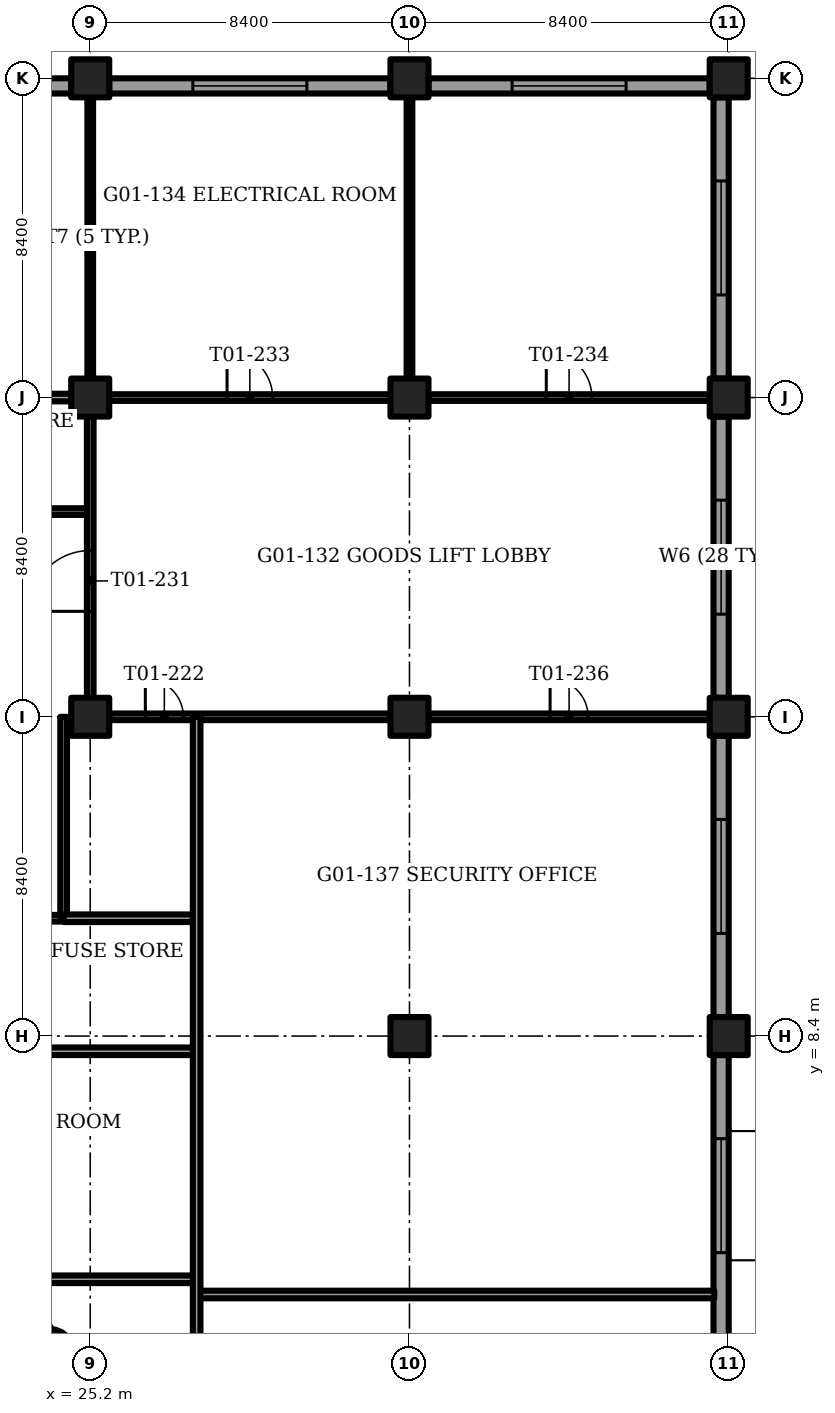
"""IFC4 building model, lengths in metres.
Left out: names, types, materials, properties, quantities, classifications, styles, units other than length and angle.
Written with IfcOpenShell. Run it as: python <this file> out.ifc"""

import sys

from ifc_helpers import new_model, si_unit, direction, frame, frame_2d, origin, origin_2d, place, context, subcontext, project, spatial, rectangle, circle, extrude, element, fill, save


model = new_model("IFC4")
c1 = context("Model", 3, precision=1e-05, world=origin(), true_north=direction((0.0, 1.0)))
c2 = subcontext(c1, "Body", "Model", "MODEL_VIEW")
j1 = project(units=[si_unit("LENGTHUNIT", "METRE"), si_unit("PLANEANGLEUNIT", "RADIAN")], contexts=[c1])
p1 = place(None, origin())
s1 = spatial("IfcSite", under=j1, at=p1, CompositionType="ELEMENT")
p2 = place(p1, origin())
s2 = spatial("IfcBuilding", under=s1, at=p2, CompositionType="ELEMENT")
p3 = place(p2, frame((0.0, 0.0, 6.0)))
s3 = spatial("IfcBuildingStorey", under=s2, at=p3, CompositionType="ELEMENT", Elevation=6.0)
for number, where, z_axis, x_axis in (
    (1, (25.2, 16.8, -0.35), (0.0, 0.0, 1.0), (1.0, 0.0, 0.0)),
    (2, (25.2, 25.2, -0.35), (0.0, 0.0, 1.0), (1.0, 0.0, 0.0)),
    (3, (25.2, 33.6, -0.35), (0.0, 0.0, 1.0), (1.0, 0.0, 0.0)),
    (4, (33.6, 8.4, -0.35), (0.0, 0.0, 1.0), (1.0, 0.0, 0.0)),
    (5, (33.6, 16.8, -0.35), (0.0, 0.0, 1.0), (1.0, 0.0, 0.0)),
    (6, (33.6, 25.2, -0.35), (0.0, 0.0, 1.0), (1.0, 0.0, 0.0)),
    (7, (33.6, 33.6, -0.35), (0.0, 0.0, 1.0), (1.0, 0.0, 0.0)),
    (8, (42.0, 8.4, -0.35), (0.0, 0.0, 1.0), (1.0, 0.0, 0.0)),
    (9, (42.0, 16.8, -0.35), (0.0, 0.0, 1.0), (1.0, 0.0, 0.0)),
    (10, (42.0, 25.2, -0.35), (0.0, 0.0, 1.0), (1.0, 0.0, 0.0)),
    (11, (42.0, 33.6, -0.35), (0.0, 0.0, 1.0), (1.0, 0.0, 0.0)),
):
    element("IfcColumn", number, at=place(p3, frame(where, z_axis=z_axis, x_axis=x_axis)), inside=s3, PredefinedType="COLUMN", context=c2, shape_type="SweptSolid", body=[
        extrude(rectangle(XDim=1.0, YDim=1.0, at=origin_2d()), origin(), (0.0, 0.0, 1.0), 4.0),
    ])
p4 = place(p3, frame((24.101, 0.0, -1.2), z_axis=(0.0, 0.0, 1.0), x_axis=(1.0, 0.0, 0.0)))
e12 = element("IfcColumn", 12, at=p4, inside=s3, PredefinedType="COLUMN", context=c2, shape_type="SweptSolid", body=[
    extrude(circle(Radius=0.7, at=origin_2d()), origin(), (0.0, 0.0, 1.0), 4.0),
])
p5 = place(p3, frame((41.8, 33.1, 0.0), z_axis=(0.0, 0.0, 1.0), x_axis=(0.0, -1.0, 0.0)))
e13 = element("IfcWall", 13, at=p5, inside=s3, PredefinedType="SOLIDWALL", context=c2, shape_type="SweptSolid", body=[
    extrude(rectangle(XDim=7.4, YDim=0.4, at=frame_2d((3.7, 0.0))), origin(), (0.0, 0.0, 1.0), 3.65),
])
p6 = place(p5, frame((2.2, 0.0, 1.0)))
e14 = element("IfcOpeningElement", 14, at=p6, cuts=e13, PredefinedType="OPENING", context=c2, shape_type="SweptSolid", body=[
    extrude(rectangle(XDim=3.0, YDim=2.2, at=frame_2d((1.5, 1.1))), frame((0.0, 0.2, 0.0), z_axis=(0.0, -1.0, 0.0), x_axis=(1.0, 0.0, 0.0)), (0.0, 0.0, 1.0), 0.4),
])
p7 = place(p3, frame((41.8, 24.7, 0.0), z_axis=(0.0, 0.0, 1.0), x_axis=(0.0, -1.0, 0.0)))
e15 = element("IfcWall", 15, at=p7, inside=s3, PredefinedType="SOLIDWALL", context=c2, shape_type="SweptSolid", body=[
    extrude(rectangle(XDim=7.4, YDim=0.4, at=frame_2d((3.7, 0.0))), origin(), (0.0, 0.0, 1.0), 3.65),
])
p8 = place(p7, frame((2.2, 0.0, 1.0)))
e16 = element("IfcOpeningElement", 16, at=p8, cuts=e15, PredefinedType="OPENING", context=c2, shape_type="SweptSolid", body=[
    extrude(rectangle(XDim=3.0, YDim=2.2, at=frame_2d((1.5, 1.1))), frame((0.0, 0.2, 0.0), z_axis=(0.0, -1.0, 0.0), x_axis=(1.0, 0.0, 0.0)), (0.0, 0.0, 1.0), 0.4),
])
p9 = place(p3, frame((41.8, 16.3, 0.0), z_axis=(0.0, 0.0, 1.0), x_axis=(0.0, -1.0, 0.0)))
e17 = element("IfcWall", 17, at=p9, inside=s3, PredefinedType="SOLIDWALL", context=c2, shape_type="SweptSolid", body=[
    extrude(rectangle(XDim=7.4, YDim=0.4, at=frame_2d((3.7, 0.0))), origin(), (0.0, 0.0, 1.0), 3.65),
])
p10 = place(p9, frame((2.2, 0.0, 1.0)))
e18 = element("IfcOpeningElement", 18, at=p10, cuts=e17, PredefinedType="OPENING", context=c2, shape_type="SweptSolid", body=[
    extrude(rectangle(XDim=3.0, YDim=2.2, at=frame_2d((1.5, 1.1))), frame((0.0, 0.2, 0.0), z_axis=(0.0, -1.0, 0.0), x_axis=(1.0, 0.0, 0.0)), (0.0, 0.0, 1.0), 0.4),
])
p11 = place(p3, frame((41.8, 7.9, 0.0), z_axis=(0.0, 0.0, 1.0), x_axis=(0.0, -1.0, 0.0)))
e19 = element("IfcWall", 19, at=p11, inside=s3, PredefinedType="SOLIDWALL", context=c2, shape_type="SweptSolid", body=[
    extrude(rectangle(XDim=7.4, YDim=0.4, at=frame_2d((3.7, 0.0))), origin(), (0.0, 0.0, 1.0), 3.65),
])
p12 = place(p11, frame((2.2, 0.0, 1.0)))
e20 = element("IfcOpeningElement", 20, at=p12, cuts=e19, PredefinedType="OPENING", context=c2, shape_type="SweptSolid", body=[
    extrude(rectangle(XDim=3.0, YDim=2.2, at=frame_2d((1.5, 1.1))), frame((0.0, 0.2, 0.0), z_axis=(0.0, -1.0, 0.0), x_axis=(1.0, 0.0, 0.0)), (0.0, 0.0, 1.0), 0.4),
])
p13 = place(p3, frame((17.3, 33.4, 0.0), z_axis=(0.0, 0.0, 1.0), x_axis=(1.0, 0.0, 0.0)))
e21 = element("IfcWall", 21, at=p13, inside=s3, PredefinedType="SOLIDWALL", context=c2, shape_type="SweptSolid", body=[
    extrude(rectangle(XDim=7.4, YDim=0.4, at=frame_2d((3.7, 0.0))), origin(), (0.0, 0.0, 1.0), 3.65),
])
p14 = place(p13, frame((2.2, 0.0, 1.0)))
e22 = element("IfcOpeningElement", 22, at=p14, cuts=e21, PredefinedType="OPENING", context=c2, shape_type="SweptSolid", body=[
    extrude(rectangle(XDim=3.0, YDim=2.2, at=frame_2d((1.5, 1.1))), frame((0.0, 0.2, 0.0), z_axis=(0.0, -1.0, 0.0), x_axis=(1.0, 0.0, 0.0)), (0.0, 0.0, 1.0), 0.4),
])
p15 = place(p3, frame((25.7, 33.4, 0.0), z_axis=(0.0, 0.0, 1.0), x_axis=(1.0, 0.0, 0.0)))
e23 = element("IfcWall", 23, at=p15, inside=s3, PredefinedType="SOLIDWALL", context=c2, shape_type="SweptSolid", body=[
    extrude(rectangle(XDim=7.4, YDim=0.4, at=frame_2d((3.7, 0.0))), origin(), (0.0, 0.0, 1.0), 3.65),
])
p16 = place(p15, frame((2.2, 0.0, 1.0)))
e24 = element("IfcOpeningElement", 24, at=p16, cuts=e23, PredefinedType="OPENING", context=c2, shape_type="SweptSolid", body=[
    extrude(rectangle(XDim=3.0, YDim=2.2, at=frame_2d((1.5, 1.1))), frame((0.0, 0.2, 0.0), z_axis=(0.0, -1.0, 0.0), x_axis=(1.0, 0.0, 0.0)), (0.0, 0.0, 1.0), 0.4),
])
p17 = place(p3, frame((34.1, 33.4, 0.0), z_axis=(0.0, 0.0, 1.0), x_axis=(1.0, 0.0, 0.0)))
e25 = element("IfcWall", 25, at=p17, inside=s3, PredefinedType="SOLIDWALL", context=c2, shape_type="SweptSolid", body=[
    extrude(rectangle(XDim=7.4, YDim=0.4, at=frame_2d((3.7, 0.0))), origin(), (0.0, 0.0, 1.0), 3.65),
])
p18 = place(p17, frame((2.2, 0.0, 1.0)))
e26 = element("IfcOpeningElement", 26, at=p18, cuts=e25, PredefinedType="OPENING", context=c2, shape_type="SweptSolid", body=[
    extrude(rectangle(XDim=3.0, YDim=2.2, at=frame_2d((1.5, 1.1))), frame((0.0, 0.2, 0.0), z_axis=(0.0, -1.0, 0.0), x_axis=(1.0, 0.0, 0.0)), (0.0, 0.0, 1.0), 0.4),
])
p19 = place(p3, frame((22.302, 11.5, 0.0), z_axis=(0.0, 0.0, 1.0), x_axis=(1.0, 0.0, 0.0)))
e27 = element("IfcWall", 27, at=p19, inside=s3, PredefinedType="PARTITIONING", context=c2, shape_type="SweptSolid", body=[
    extrude(rectangle(XDim=2.198, YDim=0.175, at=frame_2d((1.099, 0.0))), origin(), (0.0, 0.0, 1.0), 3.65),
])
p20 = place(p3, frame((25.7, 16.8, 0.0), z_axis=(0.0, 0.0, 1.0), x_axis=(1.0, 0.0, 0.0)))
e28 = element("IfcWall", 28, at=p20, inside=s3, PredefinedType="PARTITIONING", context=c2, shape_type="SweptSolid", body=[
    extrude(rectangle(XDim=7.4, YDim=0.175, at=frame_2d((3.7, 0.0))), origin(), (0.0, 0.0, 1.0), 3.65),
])
p21 = place(p20, frame((0.95, 0.0, 0.0)))
e29 = element("IfcOpeningElement", 29, at=p21, cuts=e28, PredefinedType="OPENING", context=c2, shape_type="SweptSolid", body=[
    extrude(rectangle(XDim=1.0, YDim=2.1, at=frame_2d((0.5, 1.05))), frame((0.0, 0.087, 0.0), z_axis=(0.0, -1.0, 0.0), x_axis=(1.0, 0.0, 0.0)), (0.0, 0.0, 1.0), 0.175),
])
p22 = place(p3, frame((34.1, 16.8, 0.0), z_axis=(0.0, 0.0, 1.0), x_axis=(1.0, 0.0, 0.0)))
e30 = element("IfcWall", 30, at=p22, inside=s3, PredefinedType="PARTITIONING", context=c2, shape_type="SweptSolid", body=[
    extrude(rectangle(XDim=7.4, YDim=0.175, at=frame_2d((3.7, 0.0))), origin(), (0.0, 0.0, 1.0), 3.65),
])
p23 = place(p22, frame((3.2, 0.0, 0.0)))
e31 = element("IfcOpeningElement", 31, at=p23, cuts=e30, PredefinedType="OPENING", context=c2, shape_type="SweptSolid", body=[
    extrude(rectangle(XDim=1.0, YDim=2.1, at=frame_2d((0.5, 1.05))), frame((0.0, 0.087, 0.0), z_axis=(0.0, -1.0, 0.0), x_axis=(1.0, 0.0, 0.0)), (0.0, 0.0, 1.0), 0.175),
])
p24 = place(p3, frame((-17.0, 22.2, 0.0), z_axis=(0.0, 0.0, 1.0), x_axis=(1.0, 0.0, 0.0)))
e32 = element("IfcWall", 32, at=p24, inside=s3, PredefinedType="PARTITIONING", context=c2, shape_type="SweptSolid", body=[
    extrude(rectangle(XDim=42.2, YDim=0.175, at=frame_2d((21.1, 0.0))), origin(), (0.0, 0.0, 1.0), 3.65),
])
p25 = place(p24, frame((1.262, 0.0, 0.0)))
e33 = element("IfcOpeningElement", 33, at=p25, cuts=e32, PredefinedType="OPENING", context=c2, shape_type="SweptSolid", body=[
    extrude(rectangle(XDim=1.0, YDim=2.1, at=frame_2d((0.5, 1.05))), frame((0.0, 0.087, 0.0), z_axis=(0.0, -1.0, 0.0), x_axis=(1.0, 0.0, 0.0)), (0.0, 0.0, 1.0), 0.175),
])
p26 = place(p24, frame((15.344, 0.0, 0.0)))
e34 = element("IfcOpeningElement", 34, at=p26, cuts=e32, PredefinedType="OPENING", context=c2, shape_type="SweptSolid", body=[
    extrude(rectangle(XDim=1.0, YDim=2.1, at=frame_2d((0.5, 1.05))), frame((0.0, 0.087, 0.0), z_axis=(0.0, -1.0, 0.0), x_axis=(1.0, 0.0, 0.0)), (0.0, 0.0, 1.0), 0.175),
])
p27 = place(p24, frame((17.656, 0.0, 0.0)))
e35 = element("IfcOpeningElement", 35, at=p27, cuts=e32, PredefinedType="OPENING", context=c2, shape_type="SweptSolid", body=[
    extrude(rectangle(XDim=1.0, YDim=2.1, at=frame_2d((0.5, 1.05))), frame((0.0, 0.087, 0.0), z_axis=(0.0, -1.0, 0.0), x_axis=(1.0, 0.0, 0.0)), (0.0, 0.0, 1.0), 0.175),
])
p28 = place(p24, frame((31.488, 0.0, 0.0)))
e36 = element("IfcOpeningElement", 36, at=p28, cuts=e32, PredefinedType="OPENING", context=c2, shape_type="SweptSolid", body=[
    extrude(rectangle(XDim=1.0, YDim=2.1, at=frame_2d((0.5, 1.05))), frame((0.0, 0.087, 0.0), z_axis=(0.0, -1.0, 0.0), x_axis=(1.0, 0.0, 0.0)), (0.0, 0.0, 1.0), 0.175),
])
p29 = place(p24, frame((37.35, 0.0, 0.0)))
e37 = element("IfcOpeningElement", 37, at=p29, cuts=e32, PredefinedType="OPENING", context=c2, shape_type="SweptSolid", body=[
    extrude(rectangle(XDim=1.0, YDim=2.1, at=frame_2d((0.5, 1.05))), frame((0.0, 0.087, 0.0), z_axis=(0.0, -1.0, 0.0), x_axis=(1.0, 0.0, 0.0)), (0.0, 0.0, 1.0), 0.175),
])
p30 = place(p3, frame((25.7, 25.2, 0.0), z_axis=(0.0, 0.0, 1.0), x_axis=(1.0, 0.0, 0.0)))
e38 = element("IfcWall", 38, at=p30, inside=s3, PredefinedType="PARTITIONING", context=c2, shape_type="SweptSolid", body=[
    extrude(rectangle(XDim=7.4, YDim=0.175, at=frame_2d((3.7, 0.0))), origin(), (0.0, 0.0, 1.0), 3.65),
])
p31 = place(p30, frame((3.1, 0.0, 0.0)))
e39 = element("IfcOpeningElement", 39, at=p31, cuts=e38, PredefinedType="OPENING", context=c2, shape_type="SweptSolid", body=[
    extrude(rectangle(XDim=1.2, YDim=2.1, at=frame_2d((0.6, 1.05))), frame((0.0, 0.087, 0.0), z_axis=(0.0, -1.0, 0.0), x_axis=(1.0, 0.0, 0.0)), (0.0, 0.0, 1.0), 0.175),
])
p32 = place(p3, frame((34.1, 25.2, 0.0), z_axis=(0.0, 0.0, 1.0), x_axis=(1.0, 0.0, 0.0)))
e40 = element("IfcWall", 40, at=p32, inside=s3, PredefinedType="PARTITIONING", context=c2, shape_type="SweptSolid", body=[
    extrude(rectangle(XDim=7.4, YDim=0.175, at=frame_2d((3.7, 0.0))), origin(), (0.0, 0.0, 1.0), 3.65),
])
p33 = place(p32, frame((3.1, 0.0, 0.0)))
e41 = element("IfcOpeningElement", 41, at=p33, cuts=e40, PredefinedType="OPENING", context=c2, shape_type="SweptSolid", body=[
    extrude(rectangle(XDim=1.2, YDim=2.1, at=frame_2d((0.6, 1.05))), frame((0.0, 0.087, 0.0), z_axis=(0.0, -1.0, 0.0), x_axis=(1.0, 0.0, 0.0)), (0.0, 0.0, 1.0), 0.175),
])
p34 = place(p3, frame((24.5, 11.5, 0.0), z_axis=(0.0, 0.0, 1.0), x_axis=(0.0, 1.0, 0.0)))
e42 = element("IfcWall", 42, at=p34, inside=s3, PredefinedType="PARTITIONING", context=c2, shape_type="SweptSolid", body=[
    extrude(rectangle(XDim=5.3, YDim=0.175, at=frame_2d((2.65, 0.0))), origin(), (0.0, 0.0, 1.0), 3.65),
])
p35 = place(p3, frame((25.2, 17.3, 0.0), z_axis=(0.0, 0.0, 1.0), x_axis=(0.0, 1.0, 0.0)))
e43 = element("IfcWall", 43, at=p35, inside=s3, PredefinedType="PARTITIONING", context=c2, shape_type="SweptSolid", body=[
    extrude(rectangle(XDim=7.4, YDim=0.175, at=frame_2d((3.7, 0.0))), origin(), (0.0, 0.0, 1.0), 3.65),
])
p36 = place(p35, frame((2.275, 0.0, 0.0)))
e44 = element("IfcOpeningElement", 44, at=p36, cuts=e43, PredefinedType="OPENING", context=c2, shape_type="SweptSolid", body=[
    extrude(rectangle(XDim=1.6, YDim=2.1, at=frame_2d((0.8, 1.05))), frame((0.0, 0.087, 0.0), z_axis=(0.0, -1.0, 0.0), x_axis=(1.0, 0.0, 0.0)), (0.0, 0.0, 1.0), 0.175),
])
p37 = place(p3, frame((28.0, 1.6, 0.0), z_axis=(0.0, 0.0, 1.0), x_axis=(1.0, 0.0, 0.0)))
e45 = element("IfcWall", 45, at=p37, inside=s3, PredefinedType="PARTITIONING", context=c2, shape_type="SweptSolid", body=[
    extrude(rectangle(XDim=13.62, YDim=0.2, at=frame_2d((6.81, 0.0))), origin(), (0.0, 0.0, 1.0), 3.65),
])
for number, where, z_axis, x_axis in (
    (46, (14.0, 2.0, 0.0), (0.0, 0.0, 1.0), (1.0, 0.0, 0.0)),
    (47, (14.0, 8.0, 0.0), (0.0, 0.0, 1.0), (1.0, 0.0, 0.0)),
):
    element("IfcWall", number, at=place(p3, frame(where, z_axis=z_axis, x_axis=x_axis)), inside=s3, PredefinedType="PARTITIONING", context=c2, shape_type="SweptSolid", body=[
        extrude(rectangle(XDim=14.0, YDim=0.2, at=frame_2d((7.0, 0.0))), origin(), (0.0, 0.0, 1.0), 2.8),
    ])
p38 = place(p3, frame((24.5, 11.5, 0.0), z_axis=(0.0, 0.0, 1.0), x_axis=(1.0, 0.0, 0.0)))
e48 = element("IfcWall", 48, at=p38, inside=s3, PredefinedType="PARTITIONING", context=c2, shape_type="SweptSolid", body=[
    extrude(rectangle(XDim=3.5, YDim=0.2, at=frame_2d((1.75, 0.0))), origin(), (0.0, 0.0, 1.0), 3.65),
])
p39 = place(p3, frame((15.0, 25.2, 0.0), z_axis=(0.0, 0.0, 1.0), x_axis=(1.0, 0.0, 0.0)))
e49 = element("IfcWall", 49, at=p39, inside=s3, PredefinedType="PARTITIONING", context=c2, shape_type="SweptSolid", body=[
    extrude(rectangle(XDim=9.7, YDim=0.2, at=frame_2d((4.85, 0.0))), origin(), (0.0, 0.0, 1.0), 3.65),
])
p40 = place(p39, frame((0.25, 0.0, 0.0)))
e50 = element("IfcOpeningElement", 50, at=p40, cuts=e49, PredefinedType="OPENING", context=c2, shape_type="SweptSolid", body=[
    extrude(rectangle(XDim=1.0, YDim=2.1, at=frame_2d((0.5, 1.05))), frame((0.0, 0.1, 0.0), z_axis=(0.0, -1.0, 0.0), x_axis=(1.0, 0.0, 0.0)), (0.0, 0.0, 1.0), 0.2),
])
p41 = place(p3, frame((28.0, -21.0, 0.0), z_axis=(0.0, 0.0, 1.0), x_axis=(0.0, 1.0, 0.0)))
e51 = element("IfcWall", 51, at=p41, inside=s3, PredefinedType="PARTITIONING", context=c2, shape_type="SweptSolid", body=[
    extrude(rectangle(XDim=37.8, YDim=0.2, at=frame_2d((18.9, 0.0))), origin(), (0.0, 0.0, 1.0), 3.65),
])
p42 = place(p41, frame((2.85, 0.0, 0.0)))
e52 = element("IfcOpeningElement", 52, at=p42, cuts=e51, PredefinedType="OPENING", context=c2, shape_type="SweptSolid", body=[
    extrude(rectangle(XDim=0.9, YDim=2.1, at=frame_2d((0.45, 1.05))), frame((0.0, 0.1, 0.0), z_axis=(0.0, -1.0, 0.0), x_axis=(1.0, 0.0, 0.0)), (0.0, 0.0, 1.0), 0.2),
])
p43 = place(p41, frame((12.15, 0.0, 0.0)))
e53 = element("IfcOpeningElement", 53, at=p43, cuts=e51, PredefinedType="OPENING", context=c2, shape_type="SweptSolid", body=[
    extrude(rectangle(XDim=1.0, YDim=2.1, at=frame_2d((0.5, 1.05))), frame((0.0, 0.1, 0.0), z_axis=(0.0, -1.0, 0.0), x_axis=(1.0, 0.0, 0.0)), (0.0, 0.0, 1.0), 0.2),
])
for number, where, z_axis, x_axis in (
    (54, (25.2, 25.7, 0.0), (0.0, 0.0, 1.0), (0.0, 1.0, 0.0)),
    (55, (33.6, 25.7, 0.0), (0.0, 0.0, 1.0), (0.0, 1.0, 0.0)),
):
    element("IfcWall", number, at=place(p3, frame(where, z_axis=z_axis, x_axis=x_axis)), inside=s3, PredefinedType="PARTITIONING", context=c2, shape_type="SweptSolid", body=[
        extrude(rectangle(XDim=7.4, YDim=0.15, at=frame_2d((3.7, 0.0))), origin(), (0.0, 0.0, 1.0), 3.65),
    ])
p44 = place(p6, origin())
e56 = element("IfcWindow", 56, at=p44, inside=s3, PartitioningType="SINGLE_PANEL", PredefinedType="WINDOW", context=c2, shape_type="SweptSolid", body=[
    extrude(rectangle(XDim=3.0, YDim=2.2, at=frame_2d((1.5, 1.1))), frame((0.0, 0.03, 0.0), z_axis=(0.0, -1.0, 0.0), x_axis=(1.0, 0.0, 0.0)), (0.0, 0.0, 1.0), 0.06),
])
fill(e14, e56)
p45 = place(p8, origin())
e57 = element("IfcWindow", 57, at=p45, inside=s3, PartitioningType="SINGLE_PANEL", PredefinedType="WINDOW", context=c2, shape_type="SweptSolid", body=[
    extrude(rectangle(XDim=3.0, YDim=2.2, at=frame_2d((1.5, 1.1))), frame((0.0, 0.03, 0.0), z_axis=(0.0, -1.0, 0.0), x_axis=(1.0, 0.0, 0.0)), (0.0, 0.0, 1.0), 0.06),
])
fill(e16, e57)
p46 = place(p10, origin())
e58 = element("IfcWindow", 58, at=p46, inside=s3, PartitioningType="SINGLE_PANEL", PredefinedType="WINDOW", context=c2, shape_type="SweptSolid", body=[
    extrude(rectangle(XDim=3.0, YDim=2.2, at=frame_2d((1.5, 1.1))), frame((0.0, 0.03, 0.0), z_axis=(0.0, -1.0, 0.0), x_axis=(1.0, 0.0, 0.0)), (0.0, 0.0, 1.0), 0.06),
])
fill(e18, e58)
p47 = place(p12, origin())
e59 = element("IfcWindow", 59, at=p47, inside=s3, PartitioningType="SINGLE_PANEL", PredefinedType="WINDOW", context=c2, shape_type="SweptSolid", body=[
    extrude(rectangle(XDim=3.0, YDim=2.2, at=frame_2d((1.5, 1.1))), frame((0.0, 0.03, 0.0), z_axis=(0.0, -1.0, 0.0), x_axis=(1.0, 0.0, 0.0)), (0.0, 0.0, 1.0), 0.06),
])
fill(e20, e59)
p48 = place(p16, origin())
e60 = element("IfcWindow", 60, at=p48, inside=s3, PartitioningType="SINGLE_PANEL", PredefinedType="WINDOW", context=c2, shape_type="SweptSolid", body=[
    extrude(rectangle(XDim=3.0, YDim=2.2, at=frame_2d((1.5, 1.1))), frame((0.0, 0.03, 0.0), z_axis=(0.0, -1.0, 0.0), x_axis=(1.0, 0.0, 0.0)), (0.0, 0.0, 1.0), 0.06),
])
fill(e24, e60)
p49 = place(p18, origin())
e61 = element("IfcWindow", 61, at=p49, inside=s3, PartitioningType="SINGLE_PANEL", PredefinedType="WINDOW", context=c2, shape_type="SweptSolid", body=[
    extrude(rectangle(XDim=3.0, YDim=2.2, at=frame_2d((1.5, 1.1))), frame((0.0, 0.03, 0.0), z_axis=(0.0, -1.0, 0.0), x_axis=(1.0, 0.0, 0.0)), (0.0, 0.0, 1.0), 0.06),
])
fill(e26, e61)
p50 = place(p21, origin())
e62 = element("IfcDoor", 62, at=p50, inside=s3, OperationType="SINGLE_SWING_RIGHT", PredefinedType="DOOR", context=c2, shape_type="SweptSolid", body=[
    extrude(rectangle(XDim=1.0, YDim=2.1, at=frame_2d((0.5, 1.05))), frame((0.0, 0.025, 0.0), z_axis=(0.0, -1.0, 0.0), x_axis=(1.0, 0.0, 0.0)), (0.0, 0.0, 1.0), 0.05),
])
fill(e29, e62)
p51 = place(p36, origin())
e63 = element("IfcDoor", 63, at=p51, inside=s3, OperationType="DOUBLE_DOOR_SINGLE_SWING", PredefinedType="DOOR", context=c2, shape_type="SweptSolid", body=[
    extrude(rectangle(XDim=1.6, YDim=2.1, at=frame_2d((0.8, 1.05))), frame((0.0, 0.025, 0.0), z_axis=(0.0, -1.0, 0.0), x_axis=(1.0, 0.0, 0.0)), (0.0, 0.0, 1.0), 0.05),
])
fill(e44, e63)
p52 = place(p31, origin())
e64 = element("IfcDoor", 64, at=p52, inside=s3, OperationType="SINGLE_SWING_LEFT", PredefinedType="DOOR", context=c2, shape_type="SweptSolid", body=[
    extrude(rectangle(XDim=1.2, YDim=2.1, at=frame_2d((0.6, 1.05))), frame((0.0, 0.025, 0.0), z_axis=(0.0, -1.0, 0.0), x_axis=(1.0, 0.0, 0.0)), (0.0, 0.0, 1.0), 0.05),
])
fill(e39, e64)
p53 = place(p33, origin())
e65 = element("IfcDoor", 65, at=p53, inside=s3, OperationType="SINGLE_SWING_RIGHT", PredefinedType="DOOR", context=c2, shape_type="SweptSolid", body=[
    extrude(rectangle(XDim=1.2, YDim=2.1, at=frame_2d((0.6, 1.05))), frame((0.0, 0.025, 0.0), z_axis=(0.0, -1.0, 0.0), x_axis=(1.0, 0.0, 0.0)), (0.0, 0.0, 1.0), 0.05),
])
fill(e41, e65)
p54 = place(p23, origin())
e66 = element("IfcDoor", 66, at=p54, inside=s3, OperationType="SINGLE_SWING_RIGHT", PredefinedType="DOOR", context=c2, shape_type="SweptSolid", body=[
    extrude(rectangle(XDim=1.0, YDim=2.1, at=frame_2d((0.5, 1.05))), frame((0.0, 0.025, 0.0), z_axis=(0.0, -1.0, 0.0), x_axis=(1.0, 0.0, 0.0)), (0.0, 0.0, 1.0), 0.05),
])
fill(e31, e66)
save(model, sys.argv[1])
